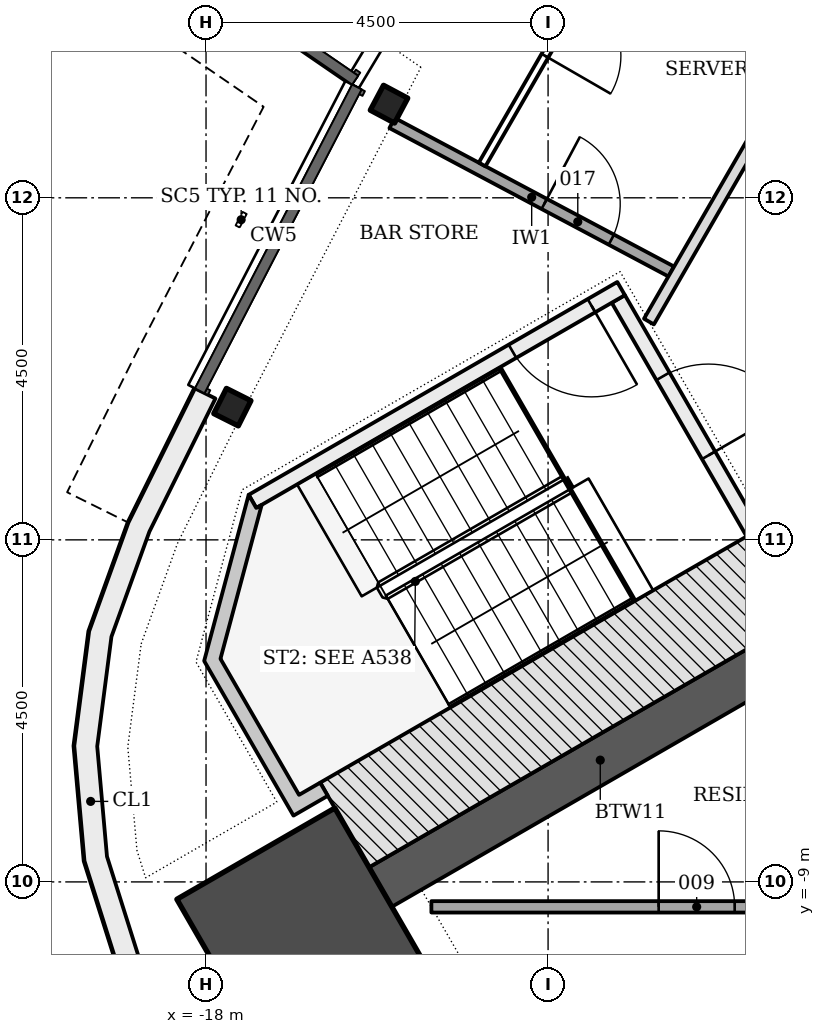
"""IFC4 building model, lengths in metres.
Left out: names, types, materials, properties, quantities, classifications, styles, units other than length and angle.
Written with IfcOpenShell. Run it as: python <this file> out.ifc"""

import sys

from ifc_helpers import new_model, si_unit, direction, frame, frame_2d, origin, origin_2d, place, context, subcontext, project, spatial, polyline, rectangle, i_section, outline, extrude, element, fill, save


model = new_model("IFC4")
c1 = context("Model", 3, precision=1e-05, world=origin(), true_north=direction((0.0, 1.0)))
c2 = subcontext(c1, "Body", "Model", "MODEL_VIEW")
j1 = project(units=[si_unit("LENGTHUNIT", "METRE"), si_unit("PLANEANGLEUNIT", "RADIAN")], contexts=[c1])
p1 = place(None, origin())
s1 = spatial("IfcSite", under=j1, at=p1, CompositionType="ELEMENT")
p2 = place(p1, origin())
s2 = spatial("IfcBuilding", under=s1, at=p2, CompositionType="ELEMENT")
p3 = place(p2, frame((0.0, 0.0, 263.4)))
s3 = spatial("IfcBuildingStorey", under=s2, at=p3, CompositionType="ELEMENT", Elevation=263.4)
p4 = place(p3, frame((-9.922, -5.728, -0.2), z_axis=(0.0, 0.0, 1.0), x_axis=(-0.866032176823, -0.499988268569, 0.0)))
e1 = element("IfcWall", 1, at=p4, inside=s3, PredefinedType="SHEAR", context=c2, shape_type="SweptSolid", body=[
    extrude(rectangle(XDim=6.678, YDim=0.6, at=frame_2d((3.339, 0.0))), origin(), (0.0, 0.0, 1.0), 3.6),
])
p5 = place(p3, frame((-16.745, -9.667, -0.2), z_axis=(0.0, 0.0, 1.0), x_axis=(-0.866025403784, -0.5, 0.0)))
e2 = element("IfcColumn", 2, at=p5, inside=s3, PredefinedType="COLUMN", context=c2, shape_type="SweptSolid", body=[
    extrude(rectangle(XDim=2.4, YDim=2.4, at=origin_2d()), origin(), (0.0, 0.0, 1.0), 3.6),
])
for number, where, z_axis, x_axis in (
    (3, (-15.593, 1.232, -0.2), (0.0, 0.0, 1.0), (-0.47, -0.883, 0.0)),
    (4, (-17.654, -2.754, -0.2), (0.0, 0.0, 1.0), (-0.449, -0.894, 0.0)),
):
    element("IfcColumn", number, at=place(p3, frame(where, z_axis=z_axis, x_axis=x_axis)), inside=s3, PredefinedType="COLUMN", context=c2, shape_type="SweptSolid", body=[
        extrude(i_section(OverallWidth=0.371, OverallDepth=0.361, WebThickness=0.012, FlangeThickness=0.02, FilletRadius=0.015, at=origin_2d()), origin(), (0.0, 0.0, 1.0), 3.6),
    ])
p6 = place(p3, origin())
e5 = element("IfcWall", 5, at=p6, inside=s3, PredefinedType="NOTDEFINED", context=c2, shape_type="SweptSolid", body=[
    extrude(outline(polyline([(-18.145, -2.507), (-19.021, -4.273), (-19.538, -5.703), (-19.733, -7.21), (-19.599, -8.724), (-19.141, -10.174), (-18.381, -11.49), (-17.355, -12.611), (-16.111, -13.485), (-14.708, -14.069), (-13.211, -14.336), (-11.244, -14.46), (-11.225, -14.161), (-13.176, -14.038), (-14.623, -13.779), (-15.965, -13.22), (-17.156, -12.385), (-18.138, -11.312), (-18.865, -10.052), (-19.303, -8.665), (-19.432, -7.216), (-19.244, -5.774), (-18.745, -4.391), (-17.876, -2.64), (-18.145, -2.507)])), origin(), (0.0, 0.0, 1.0), 3.3),
])
p7 = place(p3, frame((-12.576, -1.331, -0.2), z_axis=(0.0, 0.0, 1.0), x_axis=(0.499970499736, -0.8660424351, 0.0)))
e6 = element("IfcWall", 6, at=p7, inside=s3, PredefinedType="SHEAR", context=c2, shape_type="SweptSolid", body=[
    extrude(rectangle(XDim=3.55, YDim=0.2, at=frame_2d((1.775, 0.0))), origin(), (0.0, 0.0, 1.0), 3.6),
])
p8 = place(p7, frame((1.175, 0.0, 0.2)))
e7 = element("IfcOpeningElement", 7, at=p8, cuts=e6, PredefinedType="OPENING", context=c2, shape_type="SweptSolid", body=[
    extrude(rectangle(XDim=1.2, YDim=2.1, at=frame_2d((0.6, 1.05))), frame((0.0, 0.11, 0.0), z_axis=(0.0, -1.0, 0.0), x_axis=(1.0, 0.0, 0.0)), (0.0, 0.0, 1.0), 0.22),
])
p9 = place(p3, frame((-12.539, -1.194, -0.2), z_axis=(0.0, 0.0, 1.0), x_axis=(-0.866045472092, -0.499965239061, 0.0)))
e8 = element("IfcWall", 8, at=p9, inside=s3, PredefinedType="SHEAR", context=c2, shape_type="SweptSolid", body=[
    extrude(rectangle(XDim=5.6, YDim=0.2, at=frame_2d((2.8, 0.0))), origin(), (0.0, 0.0, 1.0), 3.6),
])
p10 = place(p9, frame((0.45, 0.0, 0.2)))
e9 = element("IfcOpeningElement", 9, at=p10, cuts=e8, PredefinedType="OPENING", context=c2, shape_type="SweptSolid", body=[
    extrude(rectangle(XDim=1.2, YDim=2.1, at=frame_2d((0.6, 1.05))), frame((0.0, 0.11, 0.0), z_axis=(0.0, -1.0, 0.0), x_axis=(1.0, 0.0, 0.0)), (0.0, 0.0, 1.0), 0.22),
])
p11 = place(p3, frame((-10.393, -4.912, -0.2), z_axis=(0.0, 0.0, 1.0), x_axis=(-0.866025486527, -0.499999856685, 0.0)))
e10 = element("IfcWall", 10, at=p11, inside=s3, PredefinedType="SHEAR", context=c2, shape_type="SweptSolid", body=[
    extrude(rectangle(XDim=6.679, YDim=1.286, at=frame_2d((3.339, 0.0))), origin(), (0.0, 0.0, 1.0), 3.6),
])
p12 = place(p3, frame((0.0, 0.0, -0.2)))
e11 = element("IfcWall", 11, at=p12, inside=s3, PredefinedType="SHEAR", context=c2, shape_type="SweptSolid", body=[
    extrude(outline(polyline([(-17.439, -3.907), (-18.025, -6.093), (-16.85, -8.128), (-16.398, -7.867), (-16.498, -7.694), (-16.498, -7.694), (-16.777, -7.855), (-17.81, -6.065), (-17.267, -4.039), (-17.339, -4.081), (-17.339, -4.081), (-17.339, -4.081), (-17.339, -4.081), (-17.339, -4.081), (-17.339, -4.081), (-17.339, -4.081), (-17.339, -4.081), (-17.339, -4.081), (-17.339, -4.081), (-17.339, -4.081), (-17.339, -4.081), (-17.339, -4.081), (-17.339, -4.081), (-17.339, -4.081), (-17.339, -4.081), (-17.339, -4.081), (-17.439, -3.907)])), origin(), (0.0, 0.0, 1.0), 3.6),
])
p13 = place(p3, frame((-15.035, -9.328, 0.0), z_axis=(0.0, 0.0, 1.0), x_axis=(1.0, 0.0, 0.0)))
e12 = element("IfcWall", 12, at=p13, inside=s3, PredefinedType="PARTITIONING", context=c2, shape_type="SweptSolid", body=[
    extrude(rectangle(XDim=8.673, YDim=0.15, at=frame_2d((4.336, 0.0))), origin(), (0.0, 0.0, 1.0), 2.852),
])
p14 = place(p13, frame((7.052, 0.0, 0.0)))
e13 = element("IfcOpeningElement", 13, at=p14, cuts=e12, PredefinedType="OPENING", context=c2, shape_type="SweptSolid", body=[
    extrude(rectangle(XDim=1.5, YDim=2.1, at=frame_2d((0.75, 1.05))), frame((0.0, 0.085, 0.0), z_axis=(0.0, -1.0, 0.0), x_axis=(1.0, 0.0, 0.0)), (0.0, 0.0, 1.0), 0.17),
])
p15 = place(p13, frame((2.99, 0.0, 0.0)))
e14 = element("IfcOpeningElement", 14, at=p15, cuts=e12, PredefinedType="OPENING", context=c2, shape_type="SweptSolid", body=[
    extrude(rectangle(XDim=1.0, YDim=2.1, at=frame_2d((0.5, 1.05))), frame((0.0, 0.085, 0.0), z_axis=(0.0, -1.0, 0.0), x_axis=(1.0, 0.0, 0.0)), (0.0, 0.0, 1.0), 0.17),
])
p16 = place(p3, frame((-7.429, 6.589, 0.0), z_axis=(0.0, 0.0, 1.0), x_axis=(-0.499994197604, -0.866028753773, 0.0)))
e15 = element("IfcWall", 15, at=p16, inside=s3, PredefinedType="PARTITIONING", context=c2, shape_type="SweptSolid", body=[
    extrude(rectangle(XDim=9.488, YDim=0.15, at=frame_2d((4.744, 0.0))), origin(), (0.0, 0.0, 1.0), 2.852),
])
p17 = place(p3, frame((-15.552, 0.984, 0.0), z_axis=(0.0, 0.0, 1.0), x_axis=(0.882898276856, -0.469564300947, 0.0)))
e16 = element("IfcWall", 16, at=p17, inside=s3, PredefinedType="PARTITIONING", context=c2, shape_type="SweptSolid", body=[
    extrude(rectangle(XDim=4.159, YDim=0.15, at=frame_2d((2.08, 0.0))), origin(), (0.0, 0.0, 1.0), 3.4),
])
p18 = place(p17, frame((2.267, 0.0, 0.0)))
e17 = element("IfcOpeningElement", 17, at=p18, cuts=e16, PredefinedType="OPENING", context=c2, shape_type="SweptSolid", body=[
    extrude(rectangle(XDim=1.0, YDim=2.1, at=frame_2d((0.5, 1.05))), frame((0.0, 0.085, 0.0), z_axis=(0.0, -1.0, 0.0), x_axis=(1.0, 0.0, 0.0)), (0.0, 0.0, 1.0), 0.17),
])
p19 = place(p3, frame((-12.204, 4.187, 0.0), z_axis=(0.0, 0.0, 1.0), x_axis=(-0.499973093216, -0.866040937866, 0.0)))
e18 = element("IfcWall", 18, at=p19, inside=s3, PredefinedType="PARTITIONING", context=c2, shape_type="SweptSolid", body=[
    extrude(rectangle(XDim=4.328, YDim=0.1, at=frame_2d((2.164, 0.0))), origin(), (0.0, 0.0, 1.0), 2.852),
])
p20 = place(p19, frame((1.677, 0.0, 0.0)))
e19 = element("IfcOpeningElement", 19, at=p20, cuts=e18, PredefinedType="OPENING", context=c2, shape_type="SweptSolid", body=[
    extrude(rectangle(XDim=1.0, YDim=2.1, at=frame_2d((0.5, 1.05))), frame((0.0, 0.06, 0.0), z_axis=(0.0, -1.0, 0.0), x_axis=(1.0, 0.0, 0.0)), (0.0, 0.0, 1.0), 0.12),
])
p21 = place(p8, origin())
e20 = element("IfcDoor", 20, at=p21, inside=s3, OperationType="SINGLE_SWING_RIGHT", PredefinedType="DOOR", context=c2, shape_type="SweptSolid", body=[
    extrude(rectangle(XDim=1.2, YDim=2.1, at=frame_2d((0.6, 1.05))), frame((0.0, 0.025, 0.0), z_axis=(0.0, -1.0, 0.0), x_axis=(1.0, 0.0, 0.0)), (0.0, 0.0, 1.0), 0.05),
])
fill(e7, e20)
p22 = place(p10, origin())
e21 = element("IfcDoor", 21, at=p22, inside=s3, OperationType="SINGLE_SWING_LEFT", PredefinedType="DOOR", context=c2, shape_type="SweptSolid", body=[
    extrude(rectangle(XDim=1.2, YDim=2.1, at=frame_2d((0.6, 1.05))), frame((0.0, 0.025, 0.0), z_axis=(0.0, -1.0, 0.0), x_axis=(1.0, 0.0, 0.0)), (0.0, 0.0, 1.0), 0.05),
])
fill(e9, e21)
p23 = place(p15, origin())
e22 = element("IfcDoor", 22, at=p23, inside=s3, OperationType="SINGLE_SWING_LEFT", PredefinedType="DOOR", context=c2, shape_type="SweptSolid", body=[
    extrude(rectangle(XDim=1.0, YDim=2.1, at=frame_2d((0.5, 1.05))), frame((0.0, 0.025, 0.0), z_axis=(0.0, -1.0, 0.0), x_axis=(1.0, 0.0, 0.0)), (0.0, 0.0, 1.0), 0.05),
])
fill(e14, e22)
p24 = place(p20, origin())
e23 = element("IfcDoor", 23, at=p24, inside=s3, OperationType="SINGLE_SWING_RIGHT", PredefinedType="DOOR", context=c2, shape_type="SweptSolid", body=[
    extrude(rectangle(XDim=1.0, YDim=2.1, at=frame_2d((0.5, 1.05))), frame((0.0, 0.025, 0.0), z_axis=(0.0, -1.0, 0.0), x_axis=(1.0, 0.0, 0.0)), (0.0, 0.0, 1.0), 0.05),
])
fill(e19, e23)
p25 = place(p18, origin())
e24 = element("IfcDoor", 24, at=p25, inside=s3, OperationType="SINGLE_SWING_LEFT", PredefinedType="DOOR", context=c2, shape_type="SweptSolid", body=[
    extrude(rectangle(XDim=1.0, YDim=2.1, at=frame_2d((0.5, 1.05))), frame((0.0, 0.025, 0.0), z_axis=(0.0, -1.0, 0.0), x_axis=(1.0, 0.0, 0.0)), (0.0, 0.0, 1.0), 0.05),
])
fill(e17, e24)
save(model, sys.argv[1])
